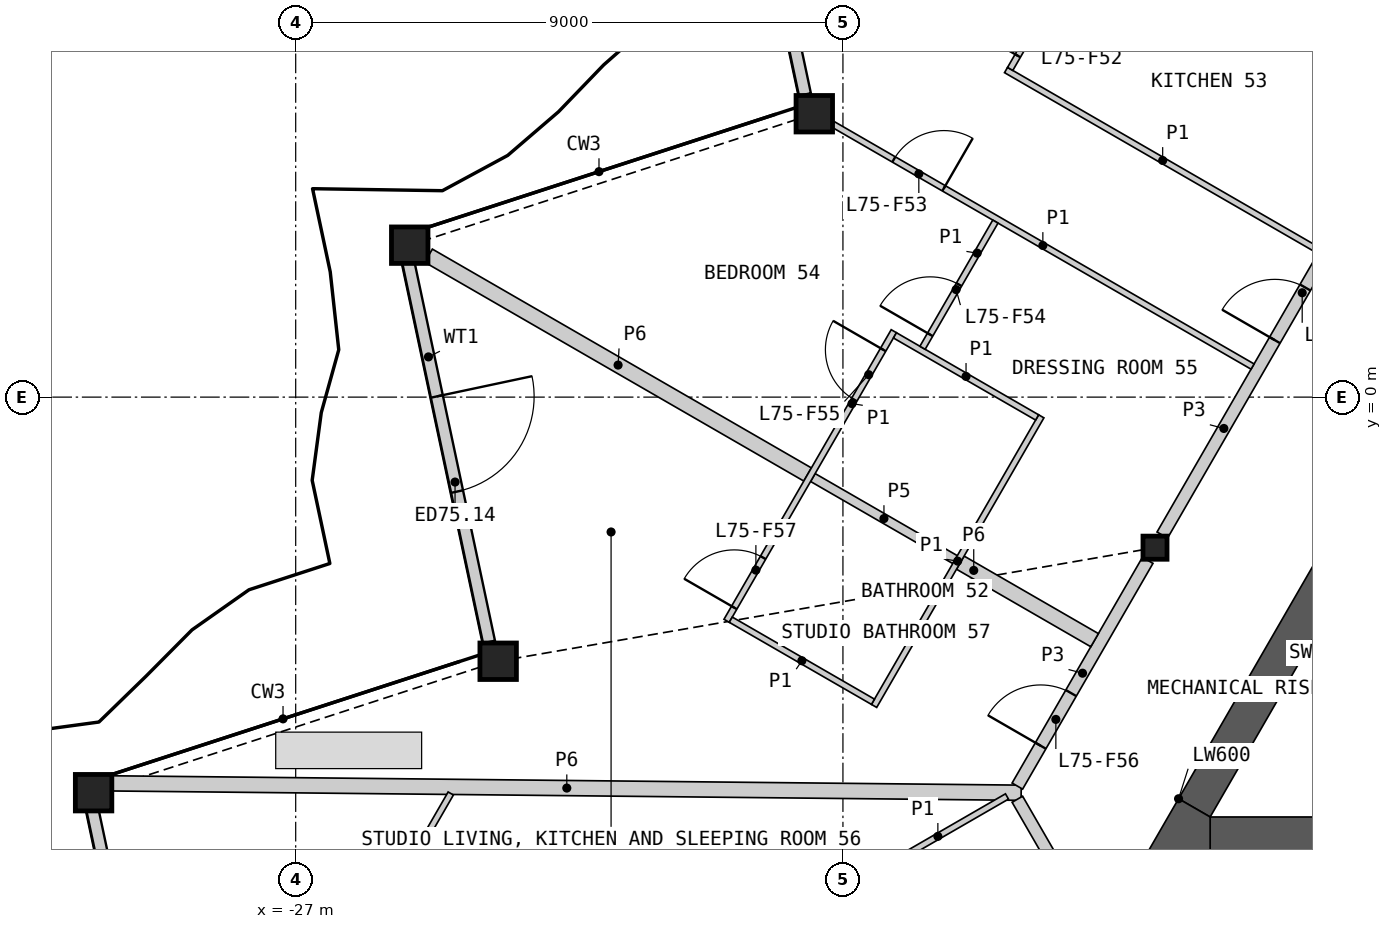
"""IFC4 building model, lengths in metres.
Left out: names, types, materials, properties, quantities, classifications, styles, units other than length and angle.
Written with IfcOpenShell. Run it as: python <this file> out.ifc"""

import sys

from ifc_helpers import new_model, si_unit, direction, frame, frame_2d, origin, origin_2d, place, context, subcontext, project, spatial, polyline, rectangle, hollow_rectangle, i_section, outline, extrude, element, fill, save


model = new_model("IFC4")
c1 = context("Model", 3, precision=1e-05, world=origin(), true_north=direction((0.0, 1.0)))
c2 = subcontext(c1, "Body", "Model", "MODEL_VIEW")
j1 = project(units=[si_unit("LENGTHUNIT", "METRE"), si_unit("PLANEANGLEUNIT", "RADIAN")], contexts=[c1])
p1 = place(None, origin())
s1 = spatial("IfcSite", under=j1, at=p1, CompositionType="ELEMENT")
p2 = place(p1, origin())
s2 = spatial("IfcBuilding", under=s1, at=p2, CompositionType="ELEMENT")
p3 = place(p2, frame((0.0, 0.0, 335.8)))
s3 = spatial("IfcBuildingStorey", under=s2, at=p3, CompositionType="ELEMENT", Elevation=335.8)
for number, where, z_axis, x_axis in (
    (1, (-18.471, 4.661, 0.0), (0.0, 0.0, 1.0), (1.0, 0.0, 0.0)),
    (2, (-25.125, 2.499, 0.0), (0.0, 0.0, 1.0), (1.0, 0.0, 0.0)),
    (3, (-23.67, -4.344, 0.0), (0.0, 0.0, 1.0), (1.0, 0.0, 0.0)),
    (4, (-30.324, -6.506, 0.0), (0.0, 0.0, 1.0), (1.0, 0.0, 0.0)),
):
    element("IfcColumn", number, at=place(p3, frame(where, z_axis=z_axis, x_axis=x_axis)), inside=s3, PredefinedType="COLUMN", context=c2, shape_type="SweptSolid", body=[
        extrude(hollow_rectangle(XDim=0.6, YDim=0.6, WallThickness=0.04, at=origin_2d()), origin(), (0.0, 0.0, 1.0), 3.4),
    ])
p4 = place(p3, frame((-12.868, -2.476, 0.0), z_axis=(0.0, 0.0, 1.0), x_axis=(1.0, 0.0, 0.0)))
e5 = element("IfcColumn", 5, at=p4, inside=s3, PredefinedType="COLUMN", context=c2, shape_type="SweptSolid", body=[
    extrude(i_section(OverallWidth=0.396, OverallDepth=0.381, WebThickness=0.019, FlangeThickness=0.03, at=origin_2d()), origin(), (0.0, 0.0, 1.0), 3.4),
])
p5 = place(p3, frame((-19.953, 11.225, 0.0), z_axis=(0.0, 0.0, 1.0), x_axis=(0.207915447, -0.978146802325, 0.0)))
e6 = element("IfcWall", 6, at=p5, inside=s3, PredefinedType="SOLIDWALL", context=c2, shape_type="SweptSolid", body=[
    extrude(rectangle(XDim=6.387, YDim=0.2, at=frame_2d((3.193, 0.0))), origin(), (0.0, 0.0, 1.0), 2.488),
])
p6 = place(p5, frame((2.262, 0.0, 0.0)))
e7 = element("IfcOpeningElement", 7, at=p6, cuts=e6, PredefinedType="OPENING", context=c2, shape_type="SweptSolid", body=[
    extrude(rectangle(XDim=1.6, YDim=2.25, at=frame_2d((0.8, 1.125))), frame((0.0, 0.11, 0.0), z_axis=(0.0, -1.0, 0.0), x_axis=(1.0, 0.0, 0.0)), (0.0, 0.0, 1.0), 0.22),
])
p7 = place(p3, frame((-25.149, 2.224, 0.0), z_axis=(0.0, 0.0, 1.0), x_axis=(0.207906266269, -0.978148753742, 0.0)))
e8 = element("IfcWall", 8, at=p7, inside=s3, PredefinedType="SOLIDWALL", context=c2, shape_type="SweptSolid", body=[
    extrude(rectangle(XDim=6.392, YDim=0.2, at=frame_2d((3.196, 0.0))), origin(), (0.0, 0.0, 1.0), 2.488),
])
p8 = place(p7, frame((2.262, 0.0, 0.0)))
e9 = element("IfcOpeningElement", 9, at=p8, cuts=e8, PredefinedType="OPENING", context=c2, shape_type="SweptSolid", body=[
    extrude(rectangle(XDim=1.6, YDim=2.25, at=frame_2d((0.8, 1.125))), frame((0.0, 0.11, 0.0), z_axis=(0.0, -1.0, 0.0), x_axis=(1.0, 0.0, 0.0)), (0.0, 0.0, 1.0), 0.22),
])
p9 = place(p3, frame((-30.345, -6.776, 0.0), z_axis=(0.0, 0.0, 1.0), x_axis=(0.207897099812, -0.978150702034, 0.0)))
e10 = element("IfcWall", 10, at=p9, inside=s3, PredefinedType="SOLIDWALL", context=c2, shape_type="SweptSolid", body=[
    extrude(rectangle(XDim=6.396, YDim=0.2, at=frame_2d((3.198, 0.0))), origin(), (0.0, 0.0, 1.0), 2.488),
])
p10 = place(p9, frame((2.262, 0.0, 0.0)))
e11 = element("IfcOpeningElement", 11, at=p10, cuts=e10, PredefinedType="OPENING", context=c2, shape_type="SweptSolid", body=[
    extrude(rectangle(XDim=1.6, YDim=2.25, at=frame_2d((0.8, 1.125))), frame((0.0, 0.11, 0.0), z_axis=(0.0, -1.0, 0.0), x_axis=(1.0, 0.0, 0.0)), (0.0, 0.0, 1.0), 0.22),
])
p11 = place(p3, origin())
e12 = element("IfcWall", 12, at=p11, inside=s3, PredefinedType="SHEAR", context=c2, shape_type="SweptSolid", body=[
    extrude(outline(polyline([(-5.307, -1.281), (-10.374, -4.206), (-10.032, -4.298), (-5.182, -1.498), (-5.307, -1.281)])), origin(), (0.0, 0.0, 1.0), 3.1),
])
p12 = place(p3, origin())
e13 = element("IfcWall", 13, at=p12, inside=s3, PredefinedType="SHEAR", context=c2, shape_type="SweptSolid", body=[
    extrude(outline(polyline([(-10.374, -4.206), (-8.83, -6.881), (-8.738, -6.539), (-10.032, -4.298), (-10.374, -4.206)])), origin(), (0.0, 0.0, 1.0), 3.1),
])
p13 = place(p3, frame((-11.961, -7.206, 0.0), z_axis=(0.0, 0.0, 1.0), x_axis=(1.0, 0.0, 0.0)))
e14 = element("IfcWall", 14, at=p13, inside=s3, PredefinedType="SHEAR", context=c2, shape_type="SweptSolid", body=[
    extrude(rectangle(XDim=4.868, YDim=0.6, at=frame_2d((2.434, 0.0))), origin(), (0.0, 0.0, 1.0), 3.1),
])
p14 = place(p3, frame((-9.562, -2.15, 0.0), z_axis=(0.0, 0.0, 1.0), x_axis=(-0.500015214976, -0.866016619236, 0.0)))
e15 = element("IfcWall", 15, at=p14, inside=s3, PredefinedType="SHEAR", context=c2, shape_type="SweptSolid", body=[
    extrude(rectangle(XDim=5.318, YDim=0.6, at=frame_2d((2.659, 0.0))), origin(), (0.0, 0.0, 1.0), 3.1),
])
p15 = place(p3, origin())
e16 = element("IfcWall", 16, at=p15, inside=s3, PredefinedType="SHEAR", context=c2, shape_type="SweptSolid", body=[
    extrude(outline(polyline([(-12.48, -6.606), (-11.961, -6.906), (-11.961, -7.506), (-13.0, -7.506), (-12.48, -6.606)])), origin(), (0.0, 0.0, 1.0), 3.1),
])
p16 = place(p3, frame((-30.014, -6.353, 0.0), z_axis=(0.0, 0.0, 1.0), x_axis=(0.999946875776, -0.010307551845, 0.0)))
e17 = element("IfcWall", 17, at=p16, inside=s3, PredefinedType="PARTITIONING", context=c2, shape_type="SweptSolid", body=[
    extrude(rectangle(XDim=14.946, YDim=0.25, at=frame_2d((7.473, 0.0))), origin(), (0.0, 0.0, 1.0), 2.33),
])
p17 = place(p3, frame((-19.615, 11.325, 0.0), z_axis=(0.0, 0.0, 1.0), x_axis=(0.86602139559, -0.500006942333, 0.0)))
e18 = element("IfcWall", 18, at=p17, inside=s3, PredefinedType="PARTITIONING", context=c2, shape_type="SweptSolid", body=[
    extrude(rectangle(XDim=12.505, YDim=0.25, at=frame_2d((6.252, 0.0))), origin(), (0.0, 0.0, 1.0), 2.33),
])
p18 = place(p3, frame((-12.748, -2.269, 0.0), z_axis=(0.0, 0.0, 1.0), x_axis=(0.499984266882, 0.866034487114, 0.0)))
e19 = element("IfcWall", 19, at=p18, inside=s3, PredefinedType="PARTITIONING", context=c2, shape_type="SweptSolid", body=[
    extrude(rectangle(XDim=8.099, YDim=0.2, at=frame_2d((4.049, 0.0))), origin(), (0.0, 0.0, 1.0), 3.1),
])
p19 = place(p18, frame((3.702, 0.0, 0.0)))
e20 = element("IfcOpeningElement", 20, at=p19, cuts=e19, PredefinedType="OPENING", context=c2, shape_type="SweptSolid", body=[
    extrude(rectangle(XDim=1.0, YDim=2.1, at=frame_2d((0.5, 1.05))), frame((0.0, 0.11, 0.0), z_axis=(0.0, -1.0, 0.0), x_axis=(1.0, 0.0, 0.0)), (0.0, 0.0, 1.0), 0.22),
])
p20 = place(p3, frame((-24.815, 2.326, 0.0), z_axis=(0.0, 0.0, 1.0), x_axis=(0.866024038922, -0.500002364004, 0.0)))
e21 = element("IfcWall", 21, at=p20, inside=s3, PredefinedType="PARTITIONING", context=c2, shape_type="SweptSolid", body=[
    extrude(rectangle(XDim=7.198, YDim=0.25, at=frame_2d((3.599, 0.0))), origin(), (0.0, 0.0, 1.0), 2.33),
])
p21 = place(p3, frame((-15.131, -6.397, 0.0), z_axis=(0.0, 0.0, 1.0), x_axis=(0.500003406062, 0.866023437285, 0.0)))
e22 = element("IfcWall", 22, at=p21, inside=s3, PredefinedType="PARTITIONING", context=c2, shape_type="SweptSolid", body=[
    extrude(rectangle(XDim=4.288, YDim=0.2, at=frame_2d((2.144, 0.0))), origin(), (0.0, 0.0, 1.0), 3.1),
])
p22 = place(p21, frame((0.766, 0.0, 0.0)))
e23 = element("IfcOpeningElement", 23, at=p22, cuts=e22, PredefinedType="OPENING", context=c2, shape_type="SweptSolid", body=[
    extrude(rectangle(XDim=1.0, YDim=2.1, at=frame_2d((0.5, 1.05))), frame((0.0, 0.11, 0.0), z_axis=(0.0, -1.0, 0.0), x_axis=(1.0, 0.0, 0.0)), (0.0, 0.0, 1.0), 0.22),
])
p23 = place(p3, frame((-15.131, -6.614, 0.0), z_axis=(0.0, 0.0, 1.0), x_axis=(0.499967746641, -0.866044024469, 0.0)))
e24 = element("IfcWall", 24, at=p23, inside=s3, PredefinedType="PARTITIONING", context=c2, shape_type="SweptSolid", body=[
    extrude(rectangle(XDim=3.676, YDim=0.2, at=frame_2d((1.838, 0.0))), origin(), (0.0, 0.0, 1.0), 3.1),
])
p24 = place(p23, frame((2.426, 0.0, 0.0)))
e25 = element("IfcOpeningElement", 25, at=p24, cuts=e24, PredefinedType="OPENING", context=c2, shape_type="SweptSolid", body=[
    extrude(rectangle(XDim=1.0, YDim=2.1, at=frame_2d((0.5, 1.05))), frame((0.0, 0.11, 0.0), z_axis=(0.0, -1.0, 0.0), x_axis=(1.0, 0.0, 0.0)), (0.0, 0.0, 1.0), 0.22),
])
p25 = place(p3, frame((-16.07, -2.722, 0.0), z_axis=(0.0, 0.0, 1.0), x_axis=(0.866030925526, -0.499990435942, 0.0)))
e26 = element("IfcWall", 26, at=p25, inside=s3, PredefinedType="PARTITIONING", context=c2, shape_type="SweptSolid", body=[
    extrude(rectangle(XDim=2.55, YDim=0.25, at=frame_2d((1.275, 0.0))), origin(), (0.0, 0.0, 1.0), 2.33),
])
p26 = place(p3, frame((-18.495, -1.323, 0.0), z_axis=(0.0, 0.0, 1.0), x_axis=(0.866059108428, -0.4999416173, 0.0)))
e27 = element("IfcWall", 27, at=p26, inside=s3, PredefinedType="PLUMBINGWALL", context=c2, shape_type="SweptSolid", body=[
    extrude(rectangle(XDim=2.7, YDim=0.15, at=frame_2d((1.35, 0.0))), origin(), (0.0, 0.0, 1.0), 2.33),
])
p27 = place(p3, frame((-18.161, 4.485, 0.0), z_axis=(0.0, 0.0, 1.0), x_axis=(0.866023773276, -0.500002824113, 0.0)))
e28 = element("IfcWall", 28, at=p27, inside=s3, PredefinedType="PARTITIONING", context=c2, shape_type="SweptSolid", body=[
    extrude(rectangle(XDim=7.965, YDim=0.1, at=frame_2d((3.982, 0.0))), origin(), (0.0, 0.0, 1.0), 2.33),
])
p28 = place(p27, frame((1.152, 0.0, 0.0)))
e29 = element("IfcOpeningElement", 29, at=p28, cuts=e28, PredefinedType="OPENING", context=c2, shape_type="SweptSolid", body=[
    extrude(rectangle(XDim=0.95, YDim=2.1, at=frame_2d((0.475, 1.05))), frame((0.0, 0.06, 0.0), z_axis=(0.0, -1.0, 0.0), x_axis=(1.0, 0.0, 0.0)), (0.0, 0.0, 1.0), 0.12),
])
p29 = place(p3, frame((-15.318, 5.38, 0.0), z_axis=(0.0, 0.0, 1.0), x_axis=(0.866035260786, -0.499982926783, 0.0)))
e30 = element("IfcWall", 30, at=p29, inside=s3, PredefinedType="PARTITIONING", context=c2, shape_type="SweptSolid", body=[
    extrude(rectangle(XDim=5.95, YDim=0.1, at=frame_2d((2.975, 0.0))), origin(), (0.0, 0.0, 1.0), 2.33),
])
p30 = place(p3, frame((-17.488, -5.079, 0.0), z_axis=(0.0, 0.0, 1.0), x_axis=(0.499996545922, 0.866027397988, 0.0)))
e31 = element("IfcWall", 31, at=p30, inside=s3, PredefinedType="PARTITIONING", context=c2, shape_type="SweptSolid", body=[
    extrude(rectangle(XDim=5.5, YDim=0.1, at=frame_2d((2.75, 0.0))), origin(), (0.0, 0.0, 1.0), 2.33),
])
p31 = place(p3, frame((-19.913, -3.679, 0.0), z_axis=(0.0, 0.0, 1.0), x_axis=(0.500015767406, 0.866016300277, 0.0)))
e32 = element("IfcWall", 32, at=p31, inside=s3, PredefinedType="PARTITIONING", context=c2, shape_type="SweptSolid", body=[
    extrude(rectangle(XDim=5.5, YDim=0.1, at=frame_2d((2.75, 0.0))), origin(), (0.0, 0.0, 1.0), 2.33),
])
p32 = place(p31, frame((4.199, 0.0, 0.0)))
e33 = element("IfcOpeningElement", 33, at=p32, cuts=e32, PredefinedType="OPENING", context=c2, shape_type="SweptSolid", body=[
    extrude(rectangle(XDim=0.95, YDim=2.1, at=frame_2d((0.475, 1.05))), frame((0.0, 0.06, 0.0), z_axis=(0.0, -1.0, 0.0), x_axis=(1.0, 0.0, 0.0)), (0.0, 0.0, 1.0), 0.12),
])
p33 = place(p31, frame((0.25, 0.0, 0.0)))
e34 = element("IfcOpeningElement", 34, at=p33, cuts=e32, PredefinedType="OPENING", context=c2, shape_type="SweptSolid", body=[
    extrude(rectangle(XDim=0.95, YDim=2.1, at=frame_2d((0.475, 1.05))), frame((0.0, 0.06, 0.0), z_axis=(0.0, -1.0, 0.0), x_axis=(1.0, 0.0, 0.0)), (0.0, 0.0, 1.0), 0.12),
])
p34 = place(p3, frame((-26.65, -10.331, 0.0), z_axis=(0.0, 0.0, 1.0), x_axis=(0.499992938033, 0.866029480975, 0.0)))
e35 = element("IfcWall", 35, at=p34, inside=s3, PredefinedType="PARTITIONING", context=c2, shape_type="SweptSolid", body=[
    extrude(rectangle(XDim=4.401, YDim=0.1, at=frame_2d((2.201, 0.0))), origin(), (0.0, 0.0, 1.0), 2.33),
])
p35 = place(p34, frame((0.657, 0.0, 0.0)))
e36 = element("IfcOpeningElement", 36, at=p35, cuts=e35, PredefinedType="OPENING", context=c2, shape_type="SweptSolid", body=[
    extrude(rectangle(XDim=0.95, YDim=2.1, at=frame_2d((0.475, 1.05))), frame((0.0, 0.06, 0.0), z_axis=(0.0, -1.0, 0.0), x_axis=(1.0, 0.0, 0.0)), (0.0, 0.0, 1.0), 0.12),
])
p36 = place(p3, frame((-15.25, 5.398, 0.0), z_axis=(0.0, 0.0, 1.0), x_axis=(0.499959355765, 0.866048868473, 0.0)))
e37 = element("IfcWall", 37, at=p36, inside=s3, PredefinedType="PARTITIONING", context=c2, shape_type="SweptSolid", body=[
    extrude(rectangle(XDim=2.825, YDim=0.1, at=frame_2d((1.413, 0.0))), origin(), (0.0, 0.0, 1.0), 2.33),
])
p37 = place(p36, frame((0.25, 0.0, 0.0)))
e38 = element("IfcOpeningElement", 38, at=p37, cuts=e37, PredefinedType="OPENING", context=c2, shape_type="SweptSolid", body=[
    extrude(rectangle(XDim=0.95, YDim=2.1, at=frame_2d((0.475, 1.05))), frame((0.0, 0.06, 0.0), z_axis=(0.0, -1.0, 0.0), x_axis=(1.0, 0.0, 0.0)), (0.0, 0.0, 1.0), 0.12),
])
for number, where, z_axis, x_axis in (
    (39, (-19.844, -3.661, 0.0), (0.0, 0.0, 1.0), (0.866, -0.5, 0.0)),
    (40, (-17.145, 1.016, 0.0), (0.0, 0.0, 1.0), (0.866, -0.5, 0.0)),
):
    element("IfcWall", number, at=place(p3, frame(where, z_axis=z_axis, x_axis=x_axis)), inside=s3, PredefinedType="PARTITIONING", context=c2, shape_type="SweptSolid", body=[
        extrude(rectangle(XDim=2.7, YDim=0.1, at=frame_2d((1.35, 0.0))), origin(), (0.0, 0.0, 1.0), 2.33),
    ])
p38 = place(p3, frame((-17.575, -7.881, 0.0), z_axis=(0.0, 0.0, 1.0), x_axis=(0.866036909293, 0.499980071345, 0.0)))
e41 = element("IfcWall", 41, at=p38, inside=s3, PredefinedType="PARTITIONING", context=c2, shape_type="SweptSolid", body=[
    extrude(rectangle(XDim=2.625, YDim=0.1, at=frame_2d((1.312, 0.0))), origin(), (0.0, 0.0, 1.0), 2.33),
])
p39 = place(p3, frame((-16.691, 0.812, 0.0), z_axis=(0.0, 0.0, 1.0), x_axis=(0.499963527173, 0.866046460357, 0.0)))
e42 = element("IfcWall", 42, at=p39, inside=s3, PredefinedType="PARTITIONING", context=c2, shape_type="SweptSolid", body=[
    extrude(rectangle(XDim=2.396, YDim=0.1, at=frame_2d((1.198, 0.0))), origin(), (0.0, 0.0, 1.0), 2.33),
])
p40 = place(p39, frame((0.25, 0.0, 0.0)))
e43 = element("IfcOpeningElement", 43, at=p40, cuts=e42, PredefinedType="OPENING", context=c2, shape_type="SweptSolid", body=[
    extrude(rectangle(XDim=0.95, YDim=2.1, at=frame_2d((0.475, 1.05))), frame((0.0, 0.06, 0.0), z_axis=(0.0, -1.0, 0.0), x_axis=(1.0, 0.0, 0.0)), (0.0, 0.0, 1.0), 0.12),
])
p41 = place(p8, origin())
e44 = element("IfcDoor", 44, at=p41, inside=s3, OperationType="DOUBLE_DOOR_SINGLE_SWING", PredefinedType="DOOR", context=c2, shape_type="SweptSolid", body=[
    extrude(rectangle(XDim=1.6, YDim=2.25, at=frame_2d((0.8, 1.125))), frame((0.0, 0.025, 0.0), z_axis=(0.0, -1.0, 0.0), x_axis=(1.0, 0.0, 0.0)), (0.0, 0.0, 1.0), 0.05),
])
fill(e9, e44)
p42 = place(p19, origin())
e45 = element("IfcDoor", 45, at=p42, inside=s3, OperationType="SINGLE_SWING_LEFT", PredefinedType="DOOR", context=c2, shape_type="SweptSolid", body=[
    extrude(rectangle(XDim=1.0, YDim=2.1, at=frame_2d((0.5, 1.05))), frame((0.0, 0.025, 0.0), z_axis=(0.0, -1.0, 0.0), x_axis=(1.0, 0.0, 0.0)), (0.0, 0.0, 1.0), 0.05),
])
fill(e20, e45)
p43 = place(p37, origin())
e46 = element("IfcDoor", 46, at=p43, inside=s3, OperationType="SINGLE_SWING_LEFT", PredefinedType="DOOR", context=c2, shape_type="SweptSolid", body=[
    extrude(rectangle(XDim=0.95, YDim=2.1, at=frame_2d((0.475, 1.05))), frame((0.0, 0.025, 0.0), z_axis=(0.0, -1.0, 0.0), x_axis=(1.0, 0.0, 0.0)), (0.0, 0.0, 1.0), 0.05),
])
fill(e38, e46)
p44 = place(p28, origin())
e47 = element("IfcDoor", 47, at=p44, inside=s3, OperationType="SINGLE_SWING_RIGHT", PredefinedType="DOOR", context=c2, shape_type="SweptSolid", body=[
    extrude(rectangle(XDim=0.95, YDim=2.1, at=frame_2d((0.475, 1.05))), frame((0.0, 0.025, 0.0), z_axis=(0.0, -1.0, 0.0), x_axis=(1.0, 0.0, 0.0)), (0.0, 0.0, 1.0), 0.05),
])
fill(e29, e47)
p45 = place(p40, origin())
e48 = element("IfcDoor", 48, at=p45, inside=s3, OperationType="SINGLE_SWING_LEFT", PredefinedType="DOOR", context=c2, shape_type="SweptSolid", body=[
    extrude(rectangle(XDim=0.95, YDim=2.1, at=frame_2d((0.475, 1.05))), frame((0.0, 0.025, 0.0), z_axis=(0.0, -1.0, 0.0), x_axis=(1.0, 0.0, 0.0)), (0.0, 0.0, 1.0), 0.05),
])
fill(e43, e48)
p46 = place(p32, origin())
e49 = element("IfcDoor", 49, at=p46, inside=s3, OperationType="SINGLE_SWING_RIGHT", PredefinedType="DOOR", context=c2, shape_type="SweptSolid", body=[
    extrude(rectangle(XDim=0.95, YDim=2.1, at=frame_2d((0.475, 1.05))), frame((0.0, 0.025, 0.0), z_axis=(0.0, -1.0, 0.0), x_axis=(1.0, 0.0, 0.0)), (0.0, 0.0, 1.0), 0.05),
])
fill(e33, e49)
p47 = place(p22, origin())
e50 = element("IfcDoor", 50, at=p47, inside=s3, OperationType="SINGLE_SWING_LEFT", PredefinedType="DOOR", context=c2, shape_type="SweptSolid", body=[
    extrude(rectangle(XDim=1.0, YDim=2.1, at=frame_2d((0.5, 1.05))), frame((0.0, 0.025, 0.0), z_axis=(0.0, -1.0, 0.0), x_axis=(1.0, 0.0, 0.0)), (0.0, 0.0, 1.0), 0.05),
])
fill(e23, e50)
p48 = place(p33, origin())
e51 = element("IfcDoor", 51, at=p48, inside=s3, OperationType="SINGLE_SWING_LEFT", PredefinedType="DOOR", context=c2, shape_type="SweptSolid", body=[
    extrude(rectangle(XDim=0.95, YDim=2.1, at=frame_2d((0.475, 1.05))), frame((0.0, 0.025, 0.0), z_axis=(0.0, -1.0, 0.0), x_axis=(1.0, 0.0, 0.0)), (0.0, 0.0, 1.0), 0.05),
])
fill(e34, e51)
save(model, sys.argv[1])
